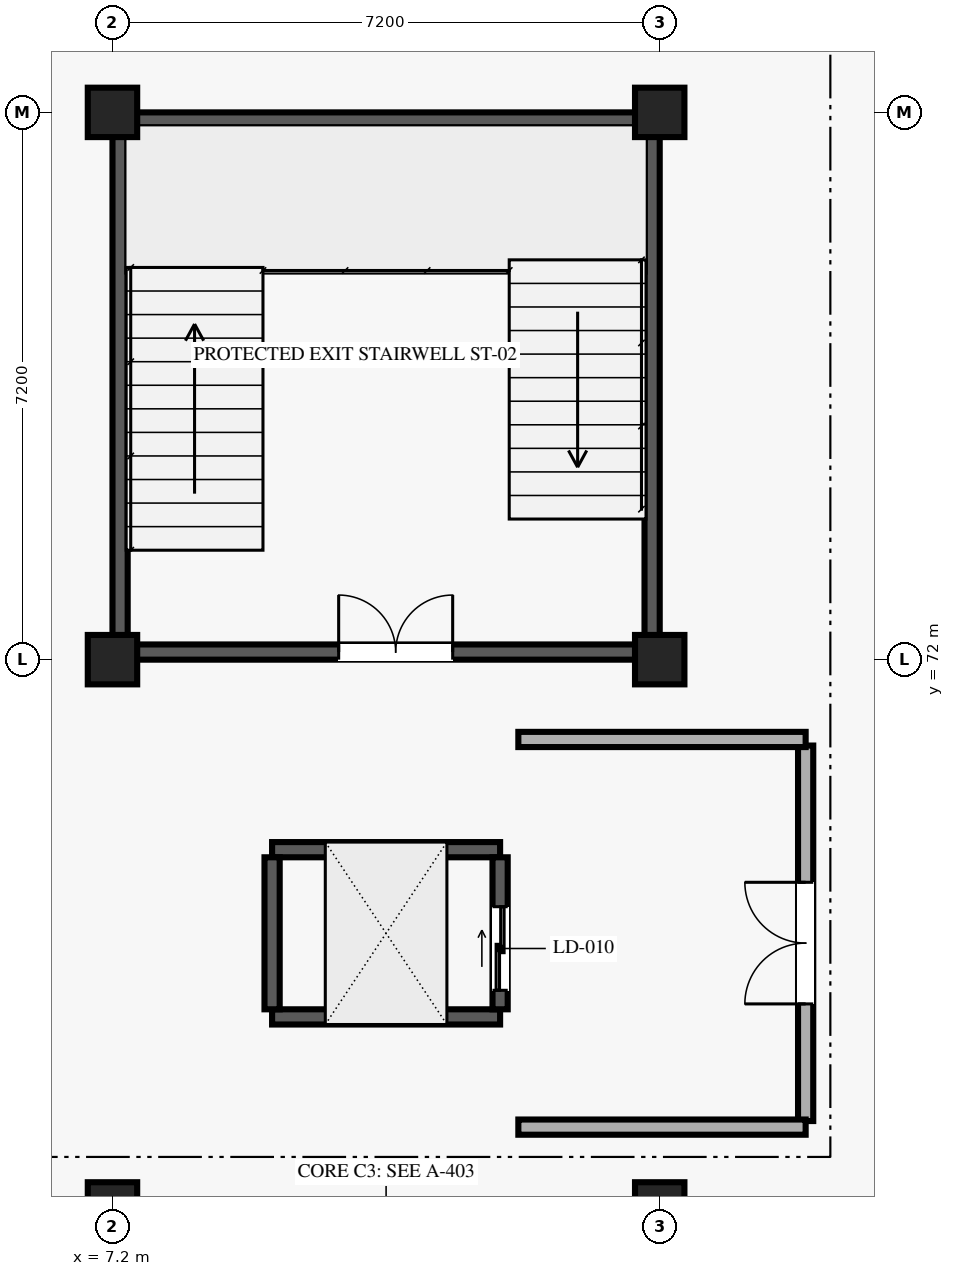
"""IFC4 building model, lengths in metres.
Left out: names, types, materials, properties, quantities, classifications, styles, units other than length and angle.
Written with IfcOpenShell. Run it as: python <this file> out.ifc"""

import sys

from ifc_helpers import new_model, si_unit, direction, frame, frame_2d, origin, origin_2d, place, context, subcontext, project, spatial, rectangle, extrude, element, fill, save


model = new_model("IFC4")
c1 = context("Model", 3, precision=1e-05, world=origin(), true_north=direction((0.0, 1.0)))
c2 = subcontext(c1, "Body", "Model", "MODEL_VIEW")
j1 = project(units=[si_unit("LENGTHUNIT", "METRE"), si_unit("PLANEANGLEUNIT", "RADIAN")], contexts=[c1])
p1 = place(None, origin())
s1 = spatial("IfcSite", under=j1, at=p1, CompositionType="ELEMENT")
p2 = place(p1, origin())
s2 = spatial("IfcBuilding", under=s1, at=p2, CompositionType="ELEMENT")
p3 = place(p2, frame((0.0, 0.0, -4.5)))
s3 = spatial("IfcBuildingStorey", under=s2, at=p3, CompositionType="ELEMENT", Elevation=-4.5)
for number, where, z_axis, x_axis in (
    (1, (7.2, 64.8, 0.0), (0.0, 0.0, 1.0), (1.0, 0.0, 0.0)),
    (2, (7.2, 72.0, 0.0), (0.0, 0.0, 1.0), (1.0, 0.0, 0.0)),
    (3, (7.2, 79.2, 0.0), (0.0, 0.0, 1.0), (1.0, 0.0, 0.0)),
    (4, (14.4, 64.8, 0.0), (0.0, 0.0, 1.0), (1.0, 0.0, 0.0)),
    (5, (14.4, 72.0, 0.0), (0.0, 0.0, 1.0), (1.0, 0.0, 0.0)),
    (6, (14.4, 79.2, 0.0), (0.0, 0.0, 1.0), (1.0, 0.0, 0.0)),
):
    element("IfcColumn", number, at=place(p3, frame(where, z_axis=z_axis, x_axis=x_axis)), inside=s3, PredefinedType="COLUMN", context=c2, shape_type="SweptSolid", body=[
        extrude(rectangle(XDim=0.65, YDim=0.65, at=origin_2d()), origin(), (0.0, 0.0, 1.0), 4.5),
    ])
p4 = place(p3, frame((7.4, 72.1, 0.0), z_axis=(0.0, 0.0, 1.0), x_axis=(1.0, 0.0, 0.0)))
e7 = element("IfcWall", 7, at=p4, inside=s3, PredefinedType="SHEAR", context=c2, shape_type="SweptSolid", body=[
    extrude(rectangle(XDim=6.8, YDim=0.2, at=frame_2d((3.4, 0.0))), origin(), (0.0, 0.0, 1.0), 4.25),
])
p5 = place(p4, frame((2.776, 0.0, 0.0)))
e8 = element("IfcOpeningElement", 8, at=p5, cuts=e7, PredefinedType="OPENING", context=c2, shape_type="SweptSolid", body=[
    extrude(rectangle(XDim=1.5, YDim=2.15, at=frame_2d((0.75, 1.075))), frame((0.0, 0.11, 0.0), z_axis=(0.0, -1.0, 0.0), x_axis=(1.0, 0.0, 0.0)), (0.0, 0.0, 1.0), 0.22),
])
for number, where, z_axis, x_axis in (
    (9, (7.4, 79.1, 0.0), (0.0, 0.0, 1.0), (1.0, 0.0, 0.0)),
    (10, (7.3, 72.2, 0.0), (0.0, 0.0, 1.0), (0.0, 1.0, 0.0)),
    (11, (14.3, 72.2, 0.0), (0.0, 0.0, 1.0), (0.0, 1.0, 0.0)),
):
    element("IfcWall", number, at=place(p3, frame(where, z_axis=z_axis, x_axis=x_axis)), inside=s3, PredefinedType="SHEAR", context=c2, shape_type="SweptSolid", body=[
        extrude(rectangle(XDim=6.8, YDim=0.2, at=frame_2d((3.4, 0.0))), origin(), (0.0, 0.0, 1.0), 4.25),
    ])
for number, where, z_axis, x_axis in (
    (12, (9.3, 67.3, 0.0), (0.0, 0.0, 1.0), (1.0, 0.0, 0.0)),
    (13, (9.3, 69.5, 0.0), (0.0, 0.0, 1.0), (1.0, 0.0, 0.0)),
):
    element("IfcWall", number, at=place(p3, frame(where, z_axis=z_axis, x_axis=x_axis)), inside=s3, PredefinedType="SHEAR", context=c2, shape_type="SweptSolid", body=[
        extrude(rectangle(XDim=3.0, YDim=0.2, at=frame_2d((1.5, 0.0))), origin(), (0.0, 0.0, 1.0), 4.25),
    ])
p6 = place(p3, frame((9.3, 67.4, 0.0), z_axis=(0.0, 0.0, 1.0), x_axis=(0.0, 1.0, 0.0)))
e14 = element("IfcWall", 14, at=p6, inside=s3, PredefinedType="SHEAR", context=c2, shape_type="SweptSolid", body=[
    extrude(rectangle(XDim=2.0, YDim=0.2, at=frame_2d((1.0, 0.0))), origin(), (0.0, 0.0, 1.0), 4.25),
])
p7 = place(p3, frame((12.3, 67.4, 0.0), z_axis=(0.0, 0.0, 1.0), x_axis=(0.0, 1.0, 0.0)))
e15 = element("IfcWall", 15, at=p7, inside=s3, PredefinedType="SHEAR", context=c2, shape_type="SweptSolid", body=[
    extrude(rectangle(XDim=2.0, YDim=0.2, at=frame_2d((1.0, 0.0))), origin(), (0.0, 0.0, 1.0), 4.25),
])
p8 = place(p7, frame((0.25, 0.0, 0.0)))
e16 = element("IfcOpeningElement", 16, at=p8, cuts=e15, PredefinedType="OPENING", context=c2, shape_type="SweptSolid", body=[
    extrude(rectangle(XDim=1.1, YDim=2.15, at=frame_2d((0.55, 1.075))), frame((0.0, 0.11, 0.0), z_axis=(0.0, -1.0, 0.0), x_axis=(1.0, 0.0, 0.0)), (0.0, 0.0, 1.0), 0.22),
])
p9 = place(p3, frame((16.32, 65.93, 0.0), z_axis=(0.0, 0.0, 1.0), x_axis=(0.0, 1.0, 0.0)))
e17 = element("IfcWall", 17, at=p9, inside=s3, PredefinedType="SOLIDWALL", context=c2, shape_type="SweptSolid", body=[
    extrude(rectangle(XDim=4.94, YDim=0.2, at=frame_2d((2.47, 0.0))), origin(), (0.0, 0.0, 1.0), 4.25),
])
p10 = place(p9, frame((1.541, 0.0, 0.0)))
e18 = element("IfcOpeningElement", 18, at=p10, cuts=e17, PredefinedType="OPENING", context=c2, shape_type="SweptSolid", body=[
    extrude(rectangle(XDim=1.6, YDim=2.2, at=frame_2d((0.8, 1.1))), frame((0.0, 0.11, 0.0), z_axis=(0.0, -1.0, 0.0), x_axis=(1.0, 0.0, 0.0)), (0.0, 0.0, 1.0), 0.22),
])
for number, where, z_axis, x_axis in (
    (19, (12.54, 65.85, 0.0), (0.0, 0.0, 1.0), (1.0, 0.0, 0.0)),
    (20, (12.54, 70.95, 0.0), (0.0, 0.0, 1.0), (1.0, 0.0, 0.0)),
):
    element("IfcWall", number, at=place(p3, frame(where, z_axis=z_axis, x_axis=x_axis)), inside=s3, PredefinedType="SOLIDWALL", context=c2, shape_type="SweptSolid", body=[
        extrude(rectangle(XDim=3.78, YDim=0.2, at=frame_2d((1.89, 0.0))), origin(), (0.0, 0.0, 1.0), 4.25),
    ])
p11 = place(p5, origin())
e21 = element("IfcDoor", 21, at=p11, inside=s3, OperationType="DOUBLE_DOOR_SINGLE_SWING", PredefinedType="DOOR", context=c2, shape_type="SweptSolid", body=[
    extrude(rectangle(XDim=1.5, YDim=2.15, at=frame_2d((0.75, 1.075))), frame((0.0, 0.025, 0.0), z_axis=(0.0, -1.0, 0.0), x_axis=(1.0, 0.0, 0.0)), (0.0, 0.0, 1.0), 0.05),
])
fill(e8, e21)
p12 = place(p8, origin())
e22 = element("IfcDoor", 22, at=p12, inside=s3, OperationType="DOUBLE_DOOR_SLIDING", PredefinedType="DOOR", context=c2, shape_type="SweptSolid", body=[
    extrude(rectangle(XDim=1.1, YDim=2.15, at=frame_2d((0.55, 1.075))), frame((0.0, 0.025, 0.0), z_axis=(0.0, -1.0, 0.0), x_axis=(1.0, 0.0, 0.0)), (0.0, 0.0, 1.0), 0.05),
])
fill(e16, e22)
p13 = place(p10, origin())
e23 = element("IfcDoor", 23, at=p13, inside=s3, OperationType="DOUBLE_DOOR_SINGLE_SWING", PredefinedType="DOOR", context=c2, shape_type="SweptSolid", body=[
    extrude(rectangle(XDim=1.6, YDim=2.2, at=frame_2d((0.8, 1.1))), frame((0.0, 0.025, 0.0), z_axis=(0.0, -1.0, 0.0), x_axis=(1.0, 0.0, 0.0)), (0.0, 0.0, 1.0), 0.05),
])
fill(e18, e23)
save(model, sys.argv[1])
